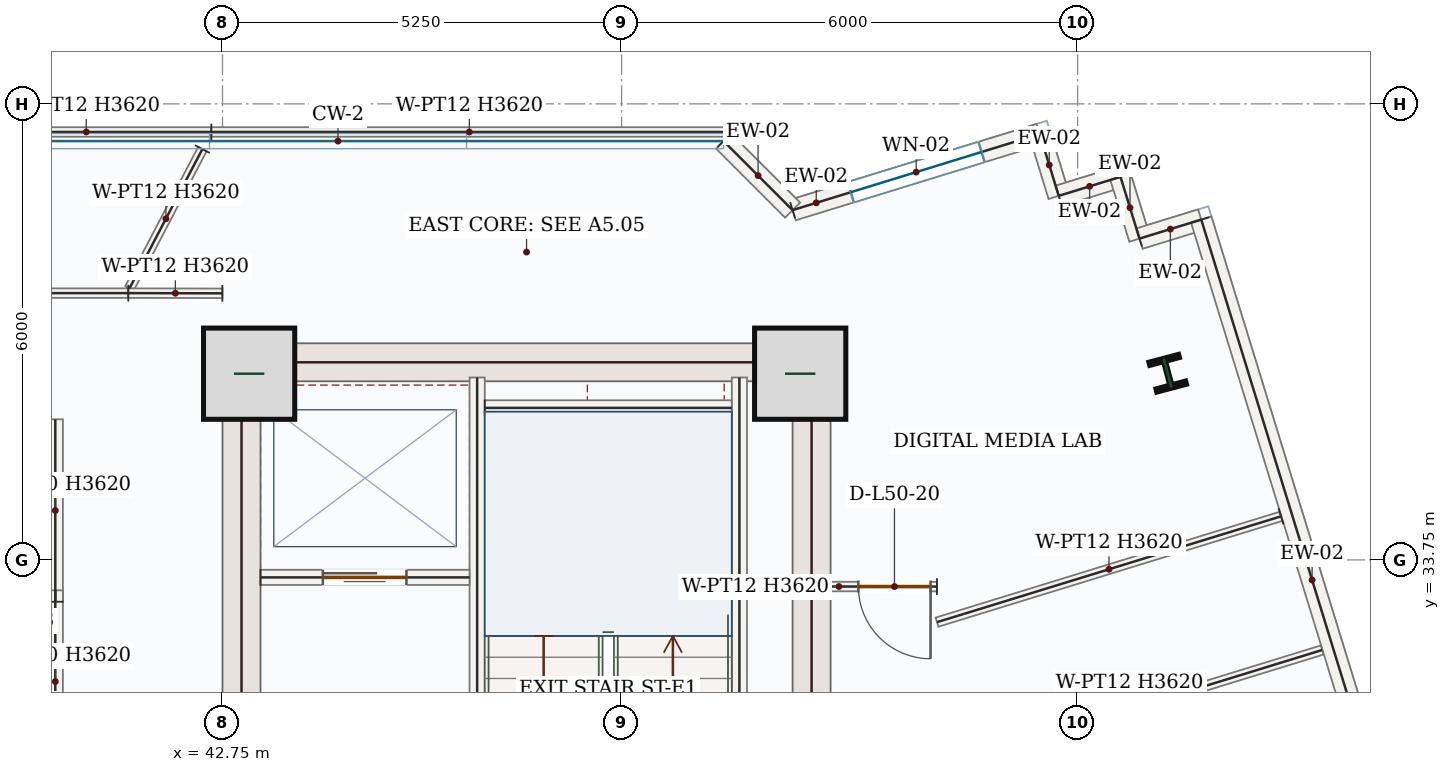
"""IFC4 building model, lengths in metres.
Left out: names, types, materials, properties, quantities, classifications, styles, units other than length and angle.
Written with IfcOpenShell. Run it as: python <this file> out.ifc"""

import sys

from ifc_helpers import new_model, si_unit, direction, frame, frame_2d, origin, origin_2d, place, context, subcontext, project, spatial, rectangle, i_section, extrude, source, transform, mapped, element, fill, save


model = new_model("IFC4")
c1 = context("Model", 3, precision=1e-05, world=origin(), true_north=direction((0.0, 1.0)))
c2 = subcontext(c1, "Body", "Model", "MODEL_VIEW")
j1 = project(units=[si_unit("LENGTHUNIT", "METRE"), si_unit("PLANEANGLEUNIT", "RADIAN")], contexts=[c1])
p1 = place(None, origin())
s1 = spatial("IfcSite", under=j1, at=p1, CompositionType="ELEMENT")
p2 = place(p1, origin())
s2 = spatial("IfcBuilding", under=s1, at=p2, CompositionType="ELEMENT")
p3 = place(p2, frame((0.0, 0.0, 213.6)))
s3 = spatial("IfcBuildingStorey", under=s2, at=p3, CompositionType="ELEMENT", Elevation=213.6)
p4 = place(p3, frame((43.0, 28.05, 0.0), z_axis=(0.0, 0.0, 1.0), x_axis=(0.0, 1.0, 0.0)))
e1 = element("IfcWall", 1, at=p4, inside=s3, PredefinedType="SHEAR", context=c2, shape_type="SweptSolid", body=[
    extrude(rectangle(XDim=8.55, YDim=0.5, at=frame_2d((4.275, 0.0))), origin(), (0.0, 0.0, 1.0), 3.62),
])
p5 = place(p4, frame((1.5, 0.0, 0.0)))
e2 = element("IfcOpeningElement", 2, at=p5, cuts=e1, PredefinedType="OPENING", context=c2, shape_type="SweptSolid", body=[
    extrude(rectangle(XDim=1.1, YDim=2.2, at=frame_2d((0.55, 1.1))), frame((0.0, 0.26, 0.0), z_axis=(0.0, -1.0, 0.0), x_axis=(1.0, 0.0, 0.0)), (0.0, 0.0, 1.0), 0.52),
])
m1 = source(origin(), c2, "Body", "SweptSolid", [
    extrude(rectangle(XDim=8.55, YDim=0.5, at=frame_2d((4.275, 0.0))), origin(), (0.0, 0.0, 1.0), 3.62),
])
p6 = place(p3, frame((50.5, 28.05, 0.0), z_axis=(0.0, 0.0, 1.0), x_axis=(0.0, 1.0, 0.0)))
e3 = element("IfcWall", 3, at=p6, inside=s3, PredefinedType="SHEAR", context=c2, shape_type="MappedRepresentation", body=[
    mapped(m1, transform((0.0, 0.0, 0.0), x_axis=(1.0, 0.0, 0.0), y_axis=(0.0, 1.0, 0.0), z_axis=(0.0, 0.0, 1.0), scale=1.0)),
])
m2 = source(origin(), c2, "Body", "SweptSolid", [
    extrude(rectangle(XDim=7.0, YDim=0.5, at=frame_2d((3.5, 0.0))), origin(), (0.0, 0.0, 1.0), 3.62),
])
p7 = place(p3, frame((43.25, 36.35, 0.0), z_axis=(0.0, 0.0, 1.0), x_axis=(1.0, 0.0, 0.0)))
e4 = element("IfcWall", 4, at=p7, inside=s3, PredefinedType="SHEAR", context=c2, shape_type="MappedRepresentation", body=[
    mapped(m2, transform((0.0, 0.0, 0.0), x_axis=(1.0, 0.0, 0.0), y_axis=(0.0, 1.0, 0.0), z_axis=(0.0, 0.0, 1.0), scale=1.0)),
])
m3 = source(origin(), c2, "Body", "SweptSolid", [
    extrude(rectangle(XDim=1.2, YDim=1.2, at=origin_2d()), origin(), (0.0, 0.0, 1.0), 3.9),
])
for number, where, z_axis, x_axis in (
    (5, (43.1, 36.2, 0.0), (0.0, 0.0, 1.0), (1.0, 0.0, 0.0)),
    (6, (50.35, 36.2, 0.0), (0.0, 0.0, 1.0), (1.0, 0.0, 0.0)),
):
    element("IfcColumn", number, at=place(p3, frame(where, z_axis=z_axis, x_axis=x_axis)), inside=s3, PredefinedType="COLUMN", context=c2, shape_type="MappedRepresentation", body=[
        mapped(m3, transform((0.0, 0.0, 0.0), x_axis=(1.0, 0.0, 0.0), y_axis=(0.0, 1.0, 0.0), z_axis=(0.0, 0.0, 1.0), scale=1.0)),
    ])
m4 = source(origin(), c2, "Body", "SweptSolid", [
    extrude(i_section(OverallWidth=0.404, OverallDepth=0.407, WebThickness=0.027, FlangeThickness=0.044, FilletRadius=0.018, at=origin_2d()), origin(), (0.0, 0.0, 1.0), 3.9),
])
p8 = place(p3, frame((55.185, 36.206, 0.0), z_axis=(0.0, 0.0, 1.0), x_axis=(0.966823388604, 0.255445757936, 0.0)))
e7 = element("IfcColumn", 7, at=p8, inside=s3, PredefinedType="COLUMN", context=c2, shape_type="MappedRepresentation", body=[
    mapped(m4, transform((0.0, 0.0, 0.0), x_axis=(1.0, 0.0, 0.0), y_axis=(0.0, 1.0, 0.0), z_axis=(0.0, 0.0, 1.0), scale=1.0)),
])
p9 = place(p3, frame((50.25, 38.352, 0.0), z_axis=(0.0, 0.0, 1.0), x_axis=(0.955782111839, 0.294075763519, 0.0)))
e8 = element("IfcWall", 8, at=p9, inside=s3, PredefinedType="SOLIDWALL", context=c2, shape_type="SweptSolid", body=[
    extrude(rectangle(XDim=3.402, YDim=0.28, at=frame_2d((1.701, 0.0))), origin(), (0.0, 0.0, 1.0), 3.62),
])
p10 = place(p9, frame((0.801, 0.0, 0.85)))
e9 = element("IfcOpeningElement", 9, at=p10, cuts=e8, PredefinedType="OPENING", context=c2, shape_type="SweptSolid", body=[
    extrude(rectangle(XDim=1.8, YDim=1.75, at=frame_2d((0.9, 0.875))), frame((0.0, 0.15, 0.0), z_axis=(0.0, -1.0, 0.0), x_axis=(1.0, 0.0, 0.0)), (0.0, 0.0, 1.0), 0.3),
])
m5 = source(origin(), c2, "Body", "SweptSolid", [
    extrude(rectangle(XDim=0.85, YDim=0.28, at=frame_2d((0.425, 0.0))), origin(), (0.0, 0.0, 1.0), 3.62),
])
for number, where, z_axis, x_axis in (
    (10, (53.502, 39.352, 0.0), (0.0, 0.0, 1.0), (0.294, -0.956, 0.0)),
    (11, (53.751, 38.54, 0.0), (0.0, 0.0, 1.0), (0.956, 0.294, 0.0)),
    (12, (54.564, 38.79, 0.0), (0.0, 0.0, 1.0), (0.294, -0.956, 0.0)),
    (13, (54.814, 37.977, 0.0), (0.0, 0.0, 1.0), (0.956, 0.294, 0.0)),
):
    element("IfcWall", number, at=place(p3, frame(where, z_axis=z_axis, x_axis=x_axis)), inside=s3, PredefinedType="SOLIDWALL", context=c2, shape_type="MappedRepresentation", body=[
        mapped(m5, transform((0.0, 0.0, 0.0), x_axis=(1.0, 0.0, 0.0), y_axis=(0.0, 1.0, 0.0), z_axis=(0.0, 0.0, 1.0), scale=1.0)),
    ])
m6 = source(origin(), c2, "Body", "SweptSolid", [
    extrude(rectangle(XDim=9.92, YDim=0.28, at=frame_2d((4.96, 0.0))), origin(), (0.0, 0.0, 1.0), 3.62),
])
p11 = place(p3, frame((55.626, 38.227, 0.0), z_axis=(0.0, 0.0, 1.0), x_axis=(0.294028777175, -0.955796567368, 0.0)))
e14 = element("IfcWall", 14, at=p11, inside=s3, PredefinedType="SOLIDWALL", context=c2, shape_type="MappedRepresentation", body=[
    mapped(m6, transform((0.0, 0.0, 0.0), x_axis=(1.0, 0.0, 0.0), y_axis=(0.0, 1.0, 0.0), z_axis=(0.0, 0.0, 1.0), scale=1.0)),
])
m7 = source(origin(), c2, "Body", "SweptSolid", [
    extrude(rectangle(XDim=1.284, YDim=0.28, at=frame_2d((0.642, 0.0))), origin(), (0.0, 0.0, 1.0), 3.62),
])
p12 = place(p3, frame((49.342, 39.26, 0.0), z_axis=(0.0, 0.0, 1.0), x_axis=(0.707011720788, -0.707201828807, 0.0)))
e15 = element("IfcWall", 15, at=p12, inside=s3, PredefinedType="SOLIDWALL", context=c2, shape_type="MappedRepresentation", body=[
    mapped(m7, transform((0.0, 0.0, 0.0), x_axis=(1.0, 0.0, 0.0), y_axis=(0.0, 1.0, 0.0), z_axis=(0.0, 0.0, 1.0), scale=1.0)),
])
m8 = source(origin(), c2, "Body", "SweptSolid", [
    extrude(rectangle(XDim=7.87, YDim=0.2, at=frame_2d((3.935, 0.0))), origin(), (0.0, 0.0, 1.0), 3.62),
])
p13 = place(p3, frame((49.55, 28.28, 0.0), z_axis=(0.0, 0.0, 1.0), x_axis=(0.0, 1.0, 0.0)))
e16 = element("IfcWall", 16, at=p13, inside=s3, PredefinedType="SOLIDWALL", context=c2, shape_type="MappedRepresentation", body=[
    mapped(m8, transform((0.0, 0.0, 0.0), x_axis=(1.0, 0.0, 0.0), y_axis=(0.0, 1.0, 0.0), z_axis=(0.0, 0.0, 1.0), scale=1.0)),
])
p14 = place(p3, frame((46.1, 28.15, 0.0), z_axis=(0.0, 0.0, 1.0), x_axis=(0.0, 1.0, 0.0)))
e17 = element("IfcWall", 17, at=p14, inside=s3, PredefinedType="SOLIDWALL", context=c2, shape_type="SweptSolid", body=[
    extrude(rectangle(XDim=8.0, YDim=0.2, at=frame_2d((4.0, 0.0))), origin(), (0.0, 0.0, 1.0), 3.62),
])
p15 = place(p14, frame((0.4, 0.0, 0.0)))
e18 = element("IfcOpeningElement", 18, at=p15, cuts=e17, PredefinedType="OPENING", context=c2, shape_type="SweptSolid", body=[
    extrude(rectangle(XDim=1.05, YDim=2.15, at=frame_2d((0.525, 1.075))), frame((0.0, 0.11, 0.0), z_axis=(0.0, -1.0, 0.0), x_axis=(1.0, 0.0, 0.0)), (0.0, 0.0, 1.0), 0.22),
])
m9 = source(origin(), c2, "Body", "SweptSolid", [
    extrude(rectangle(XDim=3.25, YDim=0.2, at=frame_2d((1.625, 0.0))), origin(), (0.0, 0.0, 1.0), 3.62),
])
p16 = place(p3, frame((46.2, 35.75, 0.0), z_axis=(0.0, 0.0, 1.0), x_axis=(1.0, 0.0, 0.0)))
e19 = element("IfcWall", 19, at=p16, inside=s3, PredefinedType="SOLIDWALL", context=c2, shape_type="MappedRepresentation", body=[
    mapped(m9, transform((0.0, 0.0, 0.0), x_axis=(1.0, 0.0, 0.0), y_axis=(0.0, 1.0, 0.0), z_axis=(0.0, 0.0, 1.0), scale=1.0)),
])
p17 = place(p3, frame((43.25, 33.52, 0.0), z_axis=(0.0, 0.0, 1.0), x_axis=(1.0, 0.0, 0.0)))
e20 = element("IfcWall", 20, at=p17, inside=s3, PredefinedType="SOLIDWALL", context=c2, shape_type="SweptSolid", body=[
    extrude(rectangle(XDim=2.75, YDim=0.2, at=frame_2d((1.375, 0.0))), origin(), (0.0, 0.0, 1.0), 3.62),
])
p18 = place(p17, frame((0.82, 0.0, 0.0)))
e21 = element("IfcOpeningElement", 21, at=p18, cuts=e20, PredefinedType="OPENING", context=c2, shape_type="SweptSolid", body=[
    extrude(rectangle(XDim=1.1, YDim=2.15, at=frame_2d((0.55, 1.075))), frame((0.0, 0.11, 0.0), z_axis=(0.0, -1.0, 0.0), x_axis=(1.0, 0.0, 0.0)), (0.0, 0.0, 1.0), 0.22),
])
m10 = source(origin(), c2, "Body", "SweptSolid", [
    extrude(rectangle(XDim=2.4, YDim=0.2, at=frame_2d((1.2, 0.0))), origin(), (0.0, 0.0, 1.0), 3.62),
])
for number, where, z_axis, x_axis in (
    (22, (40.55, 33.2, 0.0), (0.0, 0.0, 1.0), (0.0, 1.0, 0.0)),
    (23, (40.55, 30.95, 0.0), (0.0, 0.0, 1.0), (0.0, 1.0, 0.0)),
):
    element("IfcWall", number, at=place(p3, frame(where, z_axis=z_axis, x_axis=x_axis)), inside=s3, PredefinedType="SOLIDWALL", context=c2, shape_type="MappedRepresentation", body=[
        mapped(m10, transform((0.0, 0.0, 0.0), x_axis=(1.0, 0.0, 0.0), y_axis=(0.0, 1.0, 0.0), z_axis=(0.0, 0.0, 1.0), scale=1.0)),
    ])
p19 = place(p3, frame((41.51, 37.26, 0.0), z_axis=(0.0, 0.0, 1.0), x_axis=(-1.0, 0.0, 0.0)))
e24 = element("IfcWall", 24, at=p19, inside=s3, PredefinedType="PARTITIONING", context=c2, shape_type="SweptSolid", body=[
    extrude(rectangle(XDim=7.704, YDim=0.125, at=frame_2d((3.852, 0.0))), origin(), (0.0, 0.0, 1.0), 3.62),
])
p20 = place(p19, frame((5.268, 0.0, 0.0)))
e25 = element("IfcOpeningElement", 25, at=p20, cuts=e24, PredefinedType="OPENING", context=c2, shape_type="SweptSolid", body=[
    extrude(rectangle(XDim=0.95, YDim=2.15, at=frame_2d((0.475, 1.075))), frame((0.0, 0.073, 0.0), z_axis=(0.0, -1.0, 0.0), x_axis=(1.0, 0.0, 0.0)), (0.0, 0.0, 1.0), 0.145),
])
m11 = source(origin(), c2, "Body", "SweptSolid", [
    extrude(rectangle(XDim=3.292, YDim=0.125, at=frame_2d((1.646, 0.0))), origin(), (0.0, 0.0, 1.0), 3.62),
])
p21 = place(p3, frame((39.311, 39.38, 0.0), z_axis=(0.0, 0.0, 1.0), x_axis=(1.0, 0.0, 0.0)))
e26 = element("IfcWall", 26, at=p21, inside=s3, PredefinedType="PARTITIONING", context=c2, shape_type="MappedRepresentation", body=[
    mapped(m11, transform((0.0, 0.0, 0.0), x_axis=(1.0, 0.0, 0.0), y_axis=(0.0, 1.0, 0.0), z_axis=(0.0, 0.0, 1.0), scale=1.0)),
])
m12 = source(origin(), c2, "Body", "SweptSolid", [
    extrude(rectangle(XDim=2.069, YDim=0.125, at=frame_2d((1.035, 0.0))), origin(), (0.0, 0.0, 1.0), 3.62),
])
p22 = place(p3, frame((42.485, 39.155, 0.0), z_axis=(0.0, 0.0, 1.0), x_axis=(-0.46379536588, -0.885942356244, 0.0)))
e27 = element("IfcWall", 27, at=p22, inside=s3, PredefinedType="PARTITIONING", context=c2, shape_type="MappedRepresentation", body=[
    mapped(m12, transform((0.0, 0.0, 0.0), x_axis=(1.0, 0.0, 0.0), y_axis=(0.0, 1.0, 0.0), z_axis=(0.0, 0.0, 1.0), scale=1.0)),
])
m13 = source(origin(), c2, "Body", "SweptSolid", [
    extrude(rectangle(XDim=5.301, YDim=0.125, at=frame_2d((2.651, 0.0))), origin(), (0.0, 0.0, 1.0), 3.62),
])
p23 = place(p3, frame((52.15, 31.006, 0.0), z_axis=(0.0, 0.0, 1.0), x_axis=(0.955789961274, 0.294050250686, 0.0)))
e28 = element("IfcWall", 28, at=p23, inside=s3, PredefinedType="PARTITIONING", context=c2, shape_type="MappedRepresentation", body=[
    mapped(m13, transform((0.0, 0.0, 0.0), x_axis=(1.0, 0.0, 0.0), y_axis=(0.0, 1.0, 0.0), z_axis=(0.0, 0.0, 1.0), scale=1.0)),
])
m14 = source(origin(), c2, "Body", "SweptSolid", [
    extrude(rectangle(XDim=1.238, YDim=0.125, at=frame_2d((0.619, 0.0))), origin(), (0.0, 0.0, 1.0), 3.62),
])
p24 = place(p3, frame((42.748, 37.257, 0.0), z_axis=(0.0, 0.0, 1.0), x_axis=(-0.9999976473, 0.002169192293, 0.0)))
e29 = element("IfcWall", 29, at=p24, inside=s3, PredefinedType="PARTITIONING", context=c2, shape_type="MappedRepresentation", body=[
    mapped(m14, transform((0.0, 0.0, 0.0), x_axis=(1.0, 0.0, 0.0), y_axis=(0.0, 1.0, 0.0), z_axis=(0.0, 0.0, 1.0), scale=1.0)),
])
m15 = source(origin(), c2, "Body", "SweptSolid", [
    extrude(rectangle(XDim=6.789, YDim=0.125, at=frame_2d((3.395, 0.0))), origin(), (0.0, 0.0, 1.0), 3.62),
])
p25 = place(p3, frame((42.603, 39.38, 0.0), z_axis=(0.0, 0.0, 1.0), x_axis=(1.0, 0.0, 0.0)))
e30 = element("IfcWall", 30, at=p25, inside=s3, PredefinedType="PARTITIONING", context=c2, shape_type="MappedRepresentation", body=[
    mapped(m15, transform((0.0, 0.0, 0.0), x_axis=(1.0, 0.0, 0.0), y_axis=(0.0, 1.0, 0.0), z_axis=(0.0, 0.0, 1.0), scale=1.0)),
])
m16 = source(origin(), c2, "Body", "SweptSolid", [
    extrude(rectangle(XDim=4.735, YDim=0.125, at=frame_2d((2.368, 0.0))), origin(), (0.0, 0.0, 1.0), 3.62),
])
p26 = place(p3, frame((56.676, 34.323, 0.0), z_axis=(0.0, 0.0, 1.0), x_axis=(-0.955793499711, -0.294038748994, 0.0)))
e31 = element("IfcWall", 31, at=p26, inside=s3, PredefinedType="PARTITIONING", context=c2, shape_type="MappedRepresentation", body=[
    mapped(m16, transform((0.0, 0.0, 0.0), x_axis=(1.0, 0.0, 0.0), y_axis=(0.0, 1.0, 0.0), z_axis=(0.0, 0.0, 1.0), scale=1.0)),
])
p27 = place(p3, frame((52.149, 33.399, 0.0), z_axis=(0.0, 0.0, 1.0), x_axis=(-0.999999754632, 0.000700525222, 0.0)))
e32 = element("IfcWall", 32, at=p27, inside=s3, PredefinedType="PARTITIONING", context=c2, shape_type="SweptSolid", body=[
    extrude(rectangle(XDim=1.394, YDim=0.125, at=frame_2d((0.697, 0.0))), origin(), (0.0, 0.0, 1.0), 3.62),
])
p28 = place(p27, frame((0.084, 0.0, 0.0)))
e33 = element("IfcOpeningElement", 33, at=p28, cuts=e32, PredefinedType="OPENING", context=c2, shape_type="SweptSolid", body=[
    extrude(rectangle(XDim=0.95, YDim=2.15, at=frame_2d((0.475, 1.075))), frame((0.0, 0.073, 0.0), z_axis=(0.0, -1.0, 0.0), x_axis=(1.0, 0.0, 0.0)), (0.0, 0.0, 1.0), 0.145),
])
m17 = source(origin(), c2, "Body", "SweptSolid", [
    extrude(rectangle(XDim=1.8, YDim=1.75, at=frame_2d((0.9, 0.875))), frame((0.0, 0.03, 0.0), z_axis=(0.0, -1.0, 0.0), x_axis=(1.0, 0.0, 0.0)), (0.0, 0.0, 1.0), 0.06),
])
p29 = place(p10, origin())
e34 = element("IfcWindow", 34, at=p29, inside=s3, PartitioningType="DOUBLE_PANEL_VERTICAL", PredefinedType="WINDOW", context=c2, shape_type="MappedRepresentation", body=[
    mapped(m17, transform((0.0, 0.0, 0.0), x_axis=(1.0, 0.0, 0.0), y_axis=(0.0, 1.0, 0.0), z_axis=(0.0, 0.0, 1.0), scale=1.0)),
])
fill(e9, e34)
m18 = source(origin(), c2, "Body", "SweptSolid", [
    extrude(rectangle(XDim=1.1, YDim=2.15, at=frame_2d((0.55, 1.075))), frame((0.0, 0.025, 0.0), z_axis=(0.0, -1.0, 0.0), x_axis=(1.0, 0.0, 0.0)), (0.0, 0.0, 1.0), 0.05),
])
p30 = place(p18, origin())
e35 = element("IfcDoor", 35, at=p30, inside=s3, OperationType="DOUBLE_DOOR_SLIDING", PredefinedType="DOOR", context=c2, shape_type="MappedRepresentation", body=[
    mapped(m18, transform((0.0, 0.0, 0.0), x_axis=(1.0, 0.0, 0.0), y_axis=(0.0, 1.0, 0.0), z_axis=(0.0, 0.0, 1.0), scale=1.0)),
])
fill(e21, e35)
m19 = source(origin(), c2, "Body", "SweptSolid", [
    extrude(rectangle(XDim=0.95, YDim=2.15, at=frame_2d((0.475, 1.075))), frame((0.0, 0.025, 0.0), z_axis=(0.0, -1.0, 0.0), x_axis=(1.0, 0.0, 0.0)), (0.0, 0.0, 1.0), 0.05),
])
p31 = place(p28, origin())
e36 = element("IfcDoor", 36, at=p31, inside=s3, OperationType="SINGLE_SWING_LEFT", PredefinedType="DOOR", context=c2, shape_type="MappedRepresentation", body=[
    mapped(m19, transform((0.0, 0.0, 0.0), x_axis=(1.0, 0.0, 0.0), y_axis=(0.0, 1.0, 0.0), z_axis=(0.0, 0.0, 1.0), scale=1.0)),
])
fill(e33, e36)
save(model, sys.argv[1])
